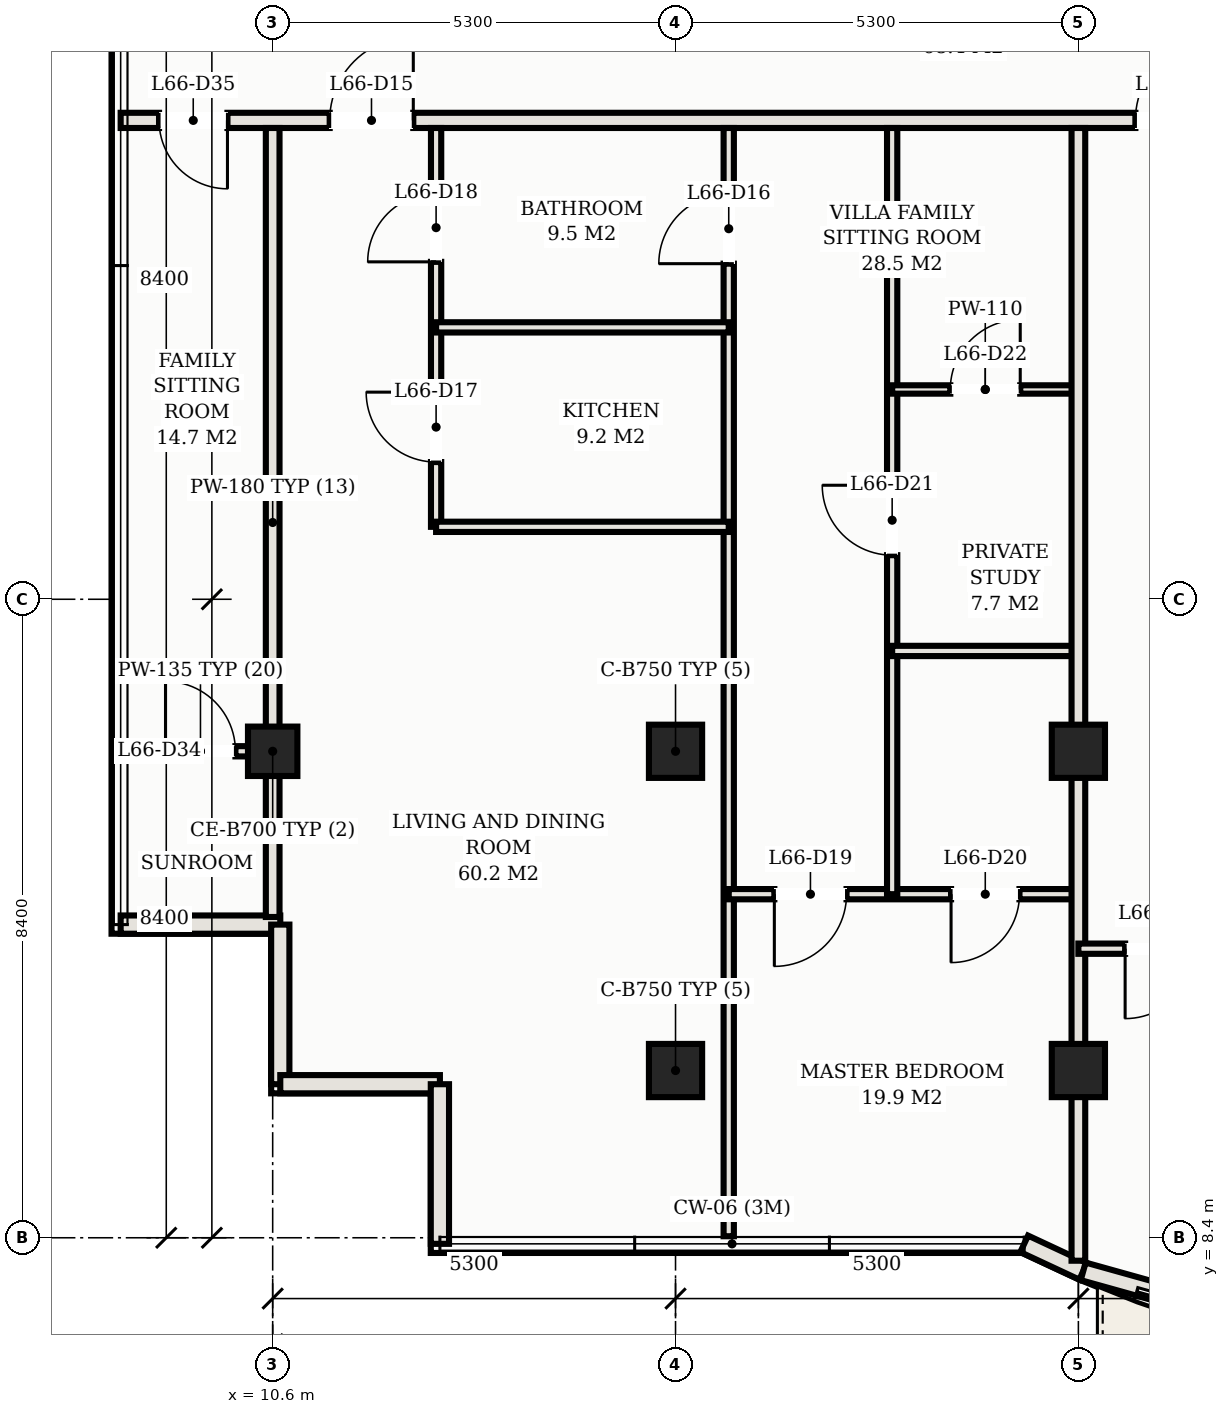
"""IFC4 building model, lengths in metres.
Left out: names, types, materials, properties, quantities, classifications, styles, units other than length and angle.
Written with IfcOpenShell. Run it as: python <this file> out.ifc"""

import sys

from ifc_helpers import new_model, si_unit, direction, frame, frame_2d, origin, origin_2d, place, context, subcontext, project, spatial, rectangle, hollow_rectangle, extrude, element, fill, save


model = new_model("IFC4")
c1 = context("Model", 3, precision=1e-05, world=origin(), true_north=direction((0.0, 1.0)))
c2 = subcontext(c1, "Body", "Model", "MODEL_VIEW")
j1 = project(units=[si_unit("LENGTHUNIT", "METRE"), si_unit("PLANEANGLEUNIT", "RADIAN")], contexts=[c1])
p1 = place(None, origin())
s1 = spatial("IfcSite", under=j1, at=p1, CompositionType="ELEMENT")
p2 = place(p1, origin())
s2 = spatial("IfcBuilding", under=s1, at=p2, CompositionType="ELEMENT")
p3 = place(p2, frame((0.0, 0.0, 239.6)))
s3 = spatial("IfcBuildingStorey", under=s2, at=p3, CompositionType="ELEMENT", Elevation=239.6)
for number, where, z_axis, x_axis in (
    (1, (15.9, 14.8, 0.0), (0.0, 0.0, 1.0), (1.0, 0.0, 0.0)),
    (2, (15.9, 10.6, 0.0), (0.0, 0.0, 1.0), (1.0, 0.0, 0.0)),
    (3, (21.2, 14.8, 0.0), (0.0, 0.0, 1.0), (1.0, 0.0, 0.0)),
    (4, (21.2, 10.6, 0.0), (0.0, 0.0, 1.0), (1.0, 0.0, 0.0)),
):
    element("IfcColumn", number, at=place(p3, frame(where, z_axis=z_axis, x_axis=x_axis)), inside=s3, PredefinedType="COLUMN", context=c2, shape_type="SweptSolid", body=[
        extrude(hollow_rectangle(XDim=0.7, YDim=0.7, WallThickness=0.025, at=origin_2d()), origin(), (0.0, 0.0, 1.0), 3.3),
    ])
p4 = place(p3, frame((10.6, 14.8, 0.0), z_axis=(0.0, 0.0, 1.0), x_axis=(1.0, 0.0, 0.0)))
e5 = element("IfcColumn", 5, at=p4, inside=s3, PredefinedType="COLUMN", context=c2, shape_type="SweptSolid", body=[
    extrude(hollow_rectangle(XDim=0.65, YDim=0.65, WallThickness=0.022, at=origin_2d()), origin(), (0.0, 0.0, 1.0), 3.3),
])
p5 = place(p3, frame((8.6, 12.52, 0.0), z_axis=(0.0, 0.0, 1.0), x_axis=(1.0, 0.0, 0.0)))
e6 = element("IfcWall", 6, at=p5, inside=s3, PredefinedType="SOLIDWALL", context=c2, shape_type="SweptSolid", body=[
    extrude(rectangle(XDim=2.1, YDim=0.24, at=frame_2d((1.05, 0.0))), origin(), (0.0, 0.0, 1.0), 3.11),
])
for number, where, z_axis, x_axis in (
    (7, (10.7, 12.52, 0.0), (0.0, 0.0, 1.0), (0.0, -1.0, 0.0)),
    (8, (10.7, 10.42, 0.0), (0.0, 0.0, 1.0), (1.0, 0.0, 0.0)),
):
    element("IfcWall", number, at=place(p3, frame(where, z_axis=z_axis, x_axis=x_axis)), inside=s3, PredefinedType="SOLIDWALL", context=c2, shape_type="SweptSolid", body=[
        extrude(rectangle(XDim=2.1, YDim=0.24, at=frame_2d((1.05, 0.0))), origin(), (0.0, 0.0, 1.0), 3.11),
    ])
p6 = place(p3, frame((12.8, 10.42, 0.0), z_axis=(0.0, 0.0, 1.0), x_axis=(0.0, -1.0, 0.0)))
e9 = element("IfcWall", 9, at=p6, inside=s3, PredefinedType="SOLIDWALL", context=c2, shape_type="SweptSolid", body=[
    extrude(rectangle(XDim=2.1, YDim=0.24, at=frame_2d((1.05, 0.0))), origin(), (0.0, 0.0, 1.0), 3.11),
])
p7 = place(p3, frame((20.487, 8.32, 0.0), z_axis=(0.0, 0.0, 1.0), x_axis=(0.906190424584, -0.422869855147, 0.0)))
e10 = element("IfcWall", 10, at=p7, inside=s3, PredefinedType="SOLIDWALL", context=c2, shape_type="SweptSolid", body=[
    extrude(rectangle(XDim=0.856, YDim=0.24, at=frame_2d((0.428, 0.0))), origin(), (0.0, 0.0, 1.0), 3.11),
])
p8 = place(p3, frame((21.263, 7.958, 0.0), z_axis=(0.0, 0.0, 1.0), x_axis=(0.963152398068, -0.268956238255, 0.0)))
e11 = element("IfcWall", 11, at=p8, inside=s3, PredefinedType="SOLIDWALL", context=c2, shape_type="SweptSolid", body=[
    extrude(rectangle(XDim=3.885, YDim=0.24, at=frame_2d((1.942, 0.0))), origin(), (0.0, 0.0, 1.0), 3.11),
])
p9 = place(p8, frame((1.074, 0.0, 0.0)))
e12 = element("IfcOpeningElement", 12, at=p9, cuts=e11, PredefinedType="OPENING", context=c2, shape_type="SweptSolid", body=[
    extrude(rectangle(XDim=1.8, YDim=2.2, at=frame_2d((0.9, 1.1))), frame((0.0, 0.13, 0.0), z_axis=(0.0, -1.0, 0.0), x_axis=(1.0, 0.0, 0.0)), (0.0, 0.0, 1.0), 0.26),
])
p10 = place(p3, frame((8.6, 23.1, 0.0), z_axis=(0.0, 0.0, 1.0), x_axis=(1.0, 0.0, 0.0)))
e13 = element("IfcWall", 13, at=p10, inside=s3, PredefinedType="PARTITIONING", context=c2, shape_type="SweptSolid", body=[
    extrude(rectangle(XDim=35.8, YDim=0.2, at=frame_2d((17.9, 0.0))), origin(), (0.0, 0.0, 1.0), 2.45),
])
p11 = place(p10, frame((2.75, 0.0, 0.0)))
e14 = element("IfcOpeningElement", 14, at=p11, cuts=e13, PredefinedType="OPENING", context=c2, shape_type="SweptSolid", body=[
    extrude(rectangle(XDim=1.1, YDim=2.25, at=frame_2d((0.55, 1.125))), frame((0.0, 0.11, 0.0), z_axis=(0.0, -1.0, 0.0), x_axis=(1.0, 0.0, 0.0)), (0.0, 0.0, 1.0), 0.22),
])
p12 = place(p10, frame((13.35, 0.0, 0.0)))
e15 = element("IfcOpeningElement", 15, at=p12, cuts=e13, PredefinedType="OPENING", context=c2, shape_type="SweptSolid", body=[
    extrude(rectangle(XDim=1.1, YDim=2.25, at=frame_2d((0.55, 1.125))), frame((0.0, 0.11, 0.0), z_axis=(0.0, -1.0, 0.0), x_axis=(1.0, 0.0, 0.0)), (0.0, 0.0, 1.0), 0.22),
])
p13 = place(p10, frame((23.95, 0.0, 0.0)))
e16 = element("IfcOpeningElement", 16, at=p13, cuts=e13, PredefinedType="OPENING", context=c2, shape_type="SweptSolid", body=[
    extrude(rectangle(XDim=1.1, YDim=2.25, at=frame_2d((0.55, 1.125))), frame((0.0, 0.11, 0.0), z_axis=(0.0, -1.0, 0.0), x_axis=(1.0, 0.0, 0.0)), (0.0, 0.0, 1.0), 0.22),
])
p14 = place(p10, frame((29.25, 0.0, 0.0)))
e17 = element("IfcOpeningElement", 17, at=p14, cuts=e13, PredefinedType="OPENING", context=c2, shape_type="SweptSolid", body=[
    extrude(rectangle(XDim=1.1, YDim=2.25, at=frame_2d((0.55, 1.125))), frame((0.0, 0.11, 0.0), z_axis=(0.0, -1.0, 0.0), x_axis=(1.0, 0.0, 0.0)), (0.0, 0.0, 1.0), 0.22),
])
p15 = place(p10, frame((0.505, 0.0, 0.0)))
e18 = element("IfcOpeningElement", 18, at=p15, cuts=e13, PredefinedType="OPENING", context=c2, shape_type="SweptSolid", body=[
    extrude(rectangle(XDim=0.9, YDim=2.15, at=frame_2d((0.45, 1.075))), frame((0.0, 0.11, 0.0), z_axis=(0.0, -1.0, 0.0), x_axis=(1.0, 0.0, 0.0)), (0.0, 0.0, 1.0), 0.22),
])
p16 = place(p10, frame((34.395, 0.0, 0.0)))
e19 = element("IfcOpeningElement", 19, at=p16, cuts=e13, PredefinedType="OPENING", context=c2, shape_type="SweptSolid", body=[
    extrude(rectangle(XDim=0.9, YDim=2.15, at=frame_2d((0.45, 1.075))), frame((0.0, 0.11, 0.0), z_axis=(0.0, -1.0, 0.0), x_axis=(1.0, 0.0, 0.0)), (0.0, 0.0, 1.0), 0.22),
])
p17 = place(p3, frame((10.6, 12.62, 0.0), z_axis=(0.0, 0.0, 1.0), x_axis=(0.0, 1.0, 0.0)))
e20 = element("IfcWall", 20, at=p17, inside=s3, PredefinedType="PARTITIONING", context=c2, shape_type="SweptSolid", body=[
    extrude(rectangle(XDim=10.38, YDim=0.18, at=frame_2d((5.19, 0.0))), origin(), (0.0, 0.0, 1.0), 2.45),
])
p18 = place(p3, frame((16.6, 8.42, 0.0), z_axis=(0.0, 0.0, 1.0), x_axis=(0.0, 1.0, 0.0)))
e21 = element("IfcWall", 21, at=p18, inside=s3, PredefinedType="PARTITIONING", context=c2, shape_type="SweptSolid", body=[
    extrude(rectangle(XDim=14.58, YDim=0.135, at=frame_2d((7.29, 0.0))), origin(), (0.0, 0.0, 1.0), 2.45),
])
p19 = place(p18, frame((12.795, 0.0, 0.0)))
e22 = element("IfcOpeningElement", 22, at=p19, cuts=e21, PredefinedType="OPENING", context=c2, shape_type="SweptSolid", body=[
    extrude(rectangle(XDim=0.92, YDim=2.15, at=frame_2d((0.46, 1.075))), frame((0.0, 0.078, 0.0), z_axis=(0.0, -1.0, 0.0), x_axis=(1.0, 0.0, 0.0)), (0.0, 0.0, 1.0), 0.155),
])
p20 = place(p3, frame((12.75, 17.753, 0.0), z_axis=(0.0, 0.0, 1.0), x_axis=(0.0, 1.0, 0.0)))
e23 = element("IfcWall", 23, at=p20, inside=s3, PredefinedType="PARTITIONING", context=c2, shape_type="SweptSolid", body=[
    extrude(rectangle(XDim=5.247, YDim=0.135, at=frame_2d((2.624, 0.0))), origin(), (0.0, 0.0, 1.0), 2.45),
])
p21 = place(p20, frame((0.852, 0.0, 0.0)))
e24 = element("IfcOpeningElement", 24, at=p21, cuts=e23, PredefinedType="OPENING", context=c2, shape_type="SweptSolid", body=[
    extrude(rectangle(XDim=0.92, YDim=2.15, at=frame_2d((0.46, 1.075))), frame((0.0, 0.078, 0.0), z_axis=(0.0, -1.0, 0.0), x_axis=(1.0, 0.0, 0.0)), (0.0, 0.0, 1.0), 0.155),
])
p22 = place(p20, frame((3.486, 0.0, 0.0)))
e25 = element("IfcOpeningElement", 25, at=p22, cuts=e23, PredefinedType="OPENING", context=c2, shape_type="SweptSolid", body=[
    extrude(rectangle(XDim=0.9, YDim=2.15, at=frame_2d((0.45, 1.075))), frame((0.0, 0.078, 0.0), z_axis=(0.0, -1.0, 0.0), x_axis=(1.0, 0.0, 0.0)), (0.0, 0.0, 1.0), 0.155),
])
for number, where, z_axis, x_axis in (
    (26, (12.75, 17.753, 0.0), (0.0, 0.0, 1.0), (1.0, 0.0, 0.0)),
    (27, (12.75, 20.377, 0.0), (0.0, 0.0, 1.0), (1.0, 0.0, 0.0)),
):
    element("IfcWall", number, at=place(p3, frame(where, z_axis=z_axis, x_axis=x_axis)), inside=s3, PredefinedType="PARTITIONING", context=c2, shape_type="SweptSolid", body=[
        extrude(rectangle(XDim=3.85, YDim=0.135, at=frame_2d((1.925, 0.0))), origin(), (0.0, 0.0, 1.0), 2.45),
    ])
p23 = place(p3, frame((16.6, 12.92, 0.0), z_axis=(0.0, 0.0, 1.0), x_axis=(1.0, 0.0, 0.0)))
e28 = element("IfcWall", 28, at=p23, inside=s3, PredefinedType="PARTITIONING", context=c2, shape_type="SweptSolid", body=[
    extrude(rectangle(XDim=4.6, YDim=0.135, at=frame_2d((2.3, 0.0))), origin(), (0.0, 0.0, 1.0), 2.45),
])
p24 = place(p23, frame((0.6, 0.0, 0.0)))
e29 = element("IfcOpeningElement", 29, at=p24, cuts=e28, PredefinedType="OPENING", context=c2, shape_type="SweptSolid", body=[
    extrude(rectangle(XDim=0.95, YDim=2.15, at=frame_2d((0.475, 1.075))), frame((0.0, 0.078, 0.0), z_axis=(0.0, -1.0, 0.0), x_axis=(1.0, 0.0, 0.0)), (0.0, 0.0, 1.0), 0.155),
])
p25 = place(p23, frame((2.925, 0.0, 0.0)))
e30 = element("IfcOpeningElement", 30, at=p25, cuts=e28, PredefinedType="OPENING", context=c2, shape_type="SweptSolid", body=[
    extrude(rectangle(XDim=0.9, YDim=2.15, at=frame_2d((0.45, 1.075))), frame((0.0, 0.078, 0.0), z_axis=(0.0, -1.0, 0.0), x_axis=(1.0, 0.0, 0.0)), (0.0, 0.0, 1.0), 0.155),
])
p26 = place(p3, frame((18.75, 12.92, 0.0), z_axis=(0.0, 0.0, 1.0), x_axis=(0.0, 1.0, 0.0)))
e31 = element("IfcWall", 31, at=p26, inside=s3, PredefinedType="PARTITIONING", context=c2, shape_type="SweptSolid", body=[
    extrude(rectangle(XDim=10.08, YDim=0.135, at=frame_2d((5.04, 0.0))), origin(), (0.0, 0.0, 1.0), 2.45),
])
p27 = place(p26, frame((4.46, 0.0, 0.0)))
e32 = element("IfcOpeningElement", 32, at=p27, cuts=e31, PredefinedType="OPENING", context=c2, shape_type="SweptSolid", body=[
    extrude(rectangle(XDim=0.92, YDim=2.15, at=frame_2d((0.46, 1.075))), frame((0.0, 0.078, 0.0), z_axis=(0.0, -1.0, 0.0), x_axis=(1.0, 0.0, 0.0)), (0.0, 0.0, 1.0), 0.155),
])
p28 = place(p3, frame((18.75, 16.12, 0.0), z_axis=(0.0, 0.0, 1.0), x_axis=(1.0, 0.0, 0.0)))
e33 = element("IfcWall", 33, at=p28, inside=s3, PredefinedType="PARTITIONING", context=c2, shape_type="SweptSolid", body=[
    extrude(rectangle(XDim=2.45, YDim=0.135, at=frame_2d((1.225, 0.0))), origin(), (0.0, 0.0, 1.0), 2.45),
])
p29 = place(p3, frame((18.75, 19.56, 0.0), z_axis=(0.0, 0.0, 1.0), x_axis=(1.0, 0.0, 0.0)))
e34 = element("IfcWall", 34, at=p29, inside=s3, PredefinedType="MOVABLE", context=c2, shape_type="SweptSolid", body=[
    extrude(rectangle(XDim=2.45, YDim=0.11, at=frame_2d((1.225, 0.0))), origin(), (0.0, 0.0, 1.0), 2.45),
])
p30 = place(p29, frame((0.765, 0.0, 0.0)))
e35 = element("IfcOpeningElement", 35, at=p30, cuts=e34, PredefinedType="OPENING", context=c2, shape_type="SweptSolid", body=[
    extrude(rectangle(XDim=0.92, YDim=2.15, at=frame_2d((0.46, 1.075))), frame((0.0, 0.065, 0.0), z_axis=(0.0, -1.0, 0.0), x_axis=(1.0, 0.0, 0.0)), (0.0, 0.0, 1.0), 0.13),
])
p31 = place(p3, frame((21.2, 8.098, 0.0), z_axis=(0.0, 0.0, 1.0), x_axis=(0.0, 1.0, 0.0)))
e36 = element("IfcWall", 36, at=p31, inside=s3, PredefinedType="PARTITIONING", context=c2, shape_type="SweptSolid", body=[
    extrude(rectangle(XDim=14.902, YDim=0.18, at=frame_2d((7.451, 0.0))), origin(), (0.0, 0.0, 1.0), 2.45),
])
p32 = place(p3, frame((21.2, 12.203, 0.0), z_axis=(0.0, 0.0, 1.0), x_axis=(1.0, 0.0, 0.0)))
e37 = element("IfcWall", 37, at=p32, inside=s3, PredefinedType="PARTITIONING", context=c2, shape_type="SweptSolid", body=[
    extrude(rectangle(XDim=10.6, YDim=0.135, at=frame_2d((5.3, 0.0))), origin(), (0.0, 0.0, 1.0), 2.45),
])
p33 = place(p32, frame((0.615, 0.0, 0.0)))
e38 = element("IfcOpeningElement", 38, at=p33, cuts=e37, PredefinedType="OPENING", context=c2, shape_type="SweptSolid", body=[
    extrude(rectangle(XDim=0.92, YDim=2.15, at=frame_2d((0.46, 1.075))), frame((0.0, 0.078, 0.0), z_axis=(0.0, -1.0, 0.0), x_axis=(1.0, 0.0, 0.0)), (0.0, 0.0, 1.0), 0.155),
])
p34 = place(p3, frame((8.7, 14.8, 0.0), z_axis=(0.0, 0.0, 1.0), x_axis=(1.0, 0.0, 0.0)))
e39 = element("IfcWall", 39, at=p34, inside=s3, PredefinedType="PARTITIONING", context=c2, shape_type="SweptSolid", body=[
    extrude(rectangle(XDim=1.9, YDim=0.135, at=frame_2d((0.95, 0.0))), origin(), (0.0, 0.0, 1.0), 2.45),
])
p35 = place(p34, frame((0.49, 0.0, 0.0)))
e40 = element("IfcOpeningElement", 40, at=p35, cuts=e39, PredefinedType="OPENING", context=c2, shape_type="SweptSolid", body=[
    extrude(rectangle(XDim=0.92, YDim=2.15, at=frame_2d((0.46, 1.075))), frame((0.0, 0.078, 0.0), z_axis=(0.0, -1.0, 0.0), x_axis=(1.0, 0.0, 0.0)), (0.0, 0.0, 1.0), 0.155),
])
p36 = place(p11, origin())
e41 = element("IfcDoor", 41, at=p36, inside=s3, OperationType="SINGLE_SWING_RIGHT", PredefinedType="DOOR", context=c2, shape_type="SweptSolid", body=[
    extrude(rectangle(XDim=1.1, YDim=2.25, at=frame_2d((0.55, 1.125))), frame((0.0, 0.025, 0.0), z_axis=(0.0, -1.0, 0.0), x_axis=(1.0, 0.0, 0.0)), (0.0, 0.0, 1.0), 0.05),
])
fill(e14, e41)
p37 = place(p19, origin())
e42 = element("IfcDoor", 42, at=p37, inside=s3, OperationType="SINGLE_SWING_LEFT", PredefinedType="DOOR", context=c2, shape_type="SweptSolid", body=[
    extrude(rectangle(XDim=0.92, YDim=2.15, at=frame_2d((0.46, 1.075))), frame((0.0, 0.025, 0.0), z_axis=(0.0, -1.0, 0.0), x_axis=(1.0, 0.0, 0.0)), (0.0, 0.0, 1.0), 0.05),
])
fill(e22, e42)
p38 = place(p21, origin())
e43 = element("IfcDoor", 43, at=p38, inside=s3, OperationType="SINGLE_SWING_RIGHT", PredefinedType="DOOR", context=c2, shape_type="SweptSolid", body=[
    extrude(rectangle(XDim=0.92, YDim=2.15, at=frame_2d((0.46, 1.075))), frame((0.0, 0.025, 0.0), z_axis=(0.0, -1.0, 0.0), x_axis=(1.0, 0.0, 0.0)), (0.0, 0.0, 1.0), 0.05),
])
fill(e24, e43)
p39 = place(p22, origin())
e44 = element("IfcDoor", 44, at=p39, inside=s3, OperationType="SINGLE_SWING_LEFT", PredefinedType="DOOR", context=c2, shape_type="SweptSolid", body=[
    extrude(rectangle(XDim=0.9, YDim=2.15, at=frame_2d((0.45, 1.075))), frame((0.0, 0.025, 0.0), z_axis=(0.0, -1.0, 0.0), x_axis=(1.0, 0.0, 0.0)), (0.0, 0.0, 1.0), 0.05),
])
fill(e25, e44)
p40 = place(p24, frame((0.95, 0.0, 0.0), z_axis=(0.0, 0.0, 1.0), x_axis=(-1.0, 0.0, 0.0)))
e45 = element("IfcDoor", 45, at=p40, inside=s3, OperationType="SINGLE_SWING_RIGHT", PredefinedType="DOOR", context=c2, shape_type="SweptSolid", body=[
    extrude(rectangle(XDim=0.95, YDim=2.15, at=frame_2d((0.475, 1.075))), frame((0.0, 0.025, 0.0), z_axis=(0.0, -1.0, 0.0), x_axis=(1.0, 0.0, 0.0)), (0.0, 0.0, 1.0), 0.05),
])
fill(e29, e45)
p41 = place(p25, frame((0.9, 0.0, 0.0), z_axis=(0.0, 0.0, 1.0), x_axis=(-1.0, 0.0, 0.0)))
e46 = element("IfcDoor", 46, at=p41, inside=s3, OperationType="SINGLE_SWING_RIGHT", PredefinedType="DOOR", context=c2, shape_type="SweptSolid", body=[
    extrude(rectangle(XDim=0.9, YDim=2.15, at=frame_2d((0.45, 1.075))), frame((0.0, 0.025, 0.0), z_axis=(0.0, -1.0, 0.0), x_axis=(1.0, 0.0, 0.0)), (0.0, 0.0, 1.0), 0.05),
])
fill(e30, e46)
p42 = place(p27, origin())
e47 = element("IfcDoor", 47, at=p42, inside=s3, OperationType="SINGLE_SWING_RIGHT", PredefinedType="DOOR", context=c2, shape_type="SweptSolid", body=[
    extrude(rectangle(XDim=0.92, YDim=2.15, at=frame_2d((0.46, 1.075))), frame((0.0, 0.025, 0.0), z_axis=(0.0, -1.0, 0.0), x_axis=(1.0, 0.0, 0.0)), (0.0, 0.0, 1.0), 0.05),
])
fill(e32, e47)
p43 = place(p30, origin())
e48 = element("IfcDoor", 48, at=p43, inside=s3, OperationType="SINGLE_SWING_RIGHT", PredefinedType="DOOR", context=c2, shape_type="SweptSolid", body=[
    extrude(rectangle(XDim=0.92, YDim=2.15, at=frame_2d((0.46, 1.075))), frame((0.0, 0.025, 0.0), z_axis=(0.0, -1.0, 0.0), x_axis=(1.0, 0.0, 0.0)), (0.0, 0.0, 1.0), 0.05),
])
fill(e35, e48)
p44 = place(p12, origin())
e49 = element("IfcDoor", 49, at=p44, inside=s3, OperationType="SINGLE_SWING_RIGHT", PredefinedType="DOOR", context=c2, shape_type="SweptSolid", body=[
    extrude(rectangle(XDim=1.1, YDim=2.25, at=frame_2d((0.55, 1.125))), frame((0.0, 0.025, 0.0), z_axis=(0.0, -1.0, 0.0), x_axis=(1.0, 0.0, 0.0)), (0.0, 0.0, 1.0), 0.05),
])
fill(e15, e49)
p45 = place(p33, frame((0.92, 0.0, 0.0), z_axis=(0.0, 0.0, 1.0), x_axis=(-1.0, 0.0, 0.0)))
e50 = element("IfcDoor", 50, at=p45, inside=s3, OperationType="SINGLE_SWING_RIGHT", PredefinedType="DOOR", context=c2, shape_type="SweptSolid", body=[
    extrude(rectangle(XDim=0.92, YDim=2.15, at=frame_2d((0.46, 1.075))), frame((0.0, 0.025, 0.0), z_axis=(0.0, -1.0, 0.0), x_axis=(1.0, 0.0, 0.0)), (0.0, 0.0, 1.0), 0.05),
])
fill(e38, e50)
p46 = place(p35, origin())
e51 = element("IfcDoor", 51, at=p46, inside=s3, OperationType="SINGLE_SWING_LEFT", PredefinedType="DOOR", context=c2, shape_type="SweptSolid", body=[
    extrude(rectangle(XDim=0.92, YDim=2.15, at=frame_2d((0.46, 1.075))), frame((0.0, 0.025, 0.0), z_axis=(0.0, -1.0, 0.0), x_axis=(1.0, 0.0, 0.0)), (0.0, 0.0, 1.0), 0.05),
])
fill(e40, e51)
p47 = place(p15, frame((0.9, 0.0, 0.0), z_axis=(0.0, 0.0, 1.0), x_axis=(-1.0, 0.0, 0.0)))
e52 = element("IfcDoor", 52, at=p47, inside=s3, OperationType="SINGLE_SWING_LEFT", PredefinedType="DOOR", context=c2, shape_type="SweptSolid", body=[
    extrude(rectangle(XDim=0.9, YDim=2.15, at=frame_2d((0.45, 1.075))), frame((0.0, 0.025, 0.0), z_axis=(0.0, -1.0, 0.0), x_axis=(1.0, 0.0, 0.0)), (0.0, 0.0, 1.0), 0.05),
])
fill(e18, e52)
save(model, sys.argv[1])
